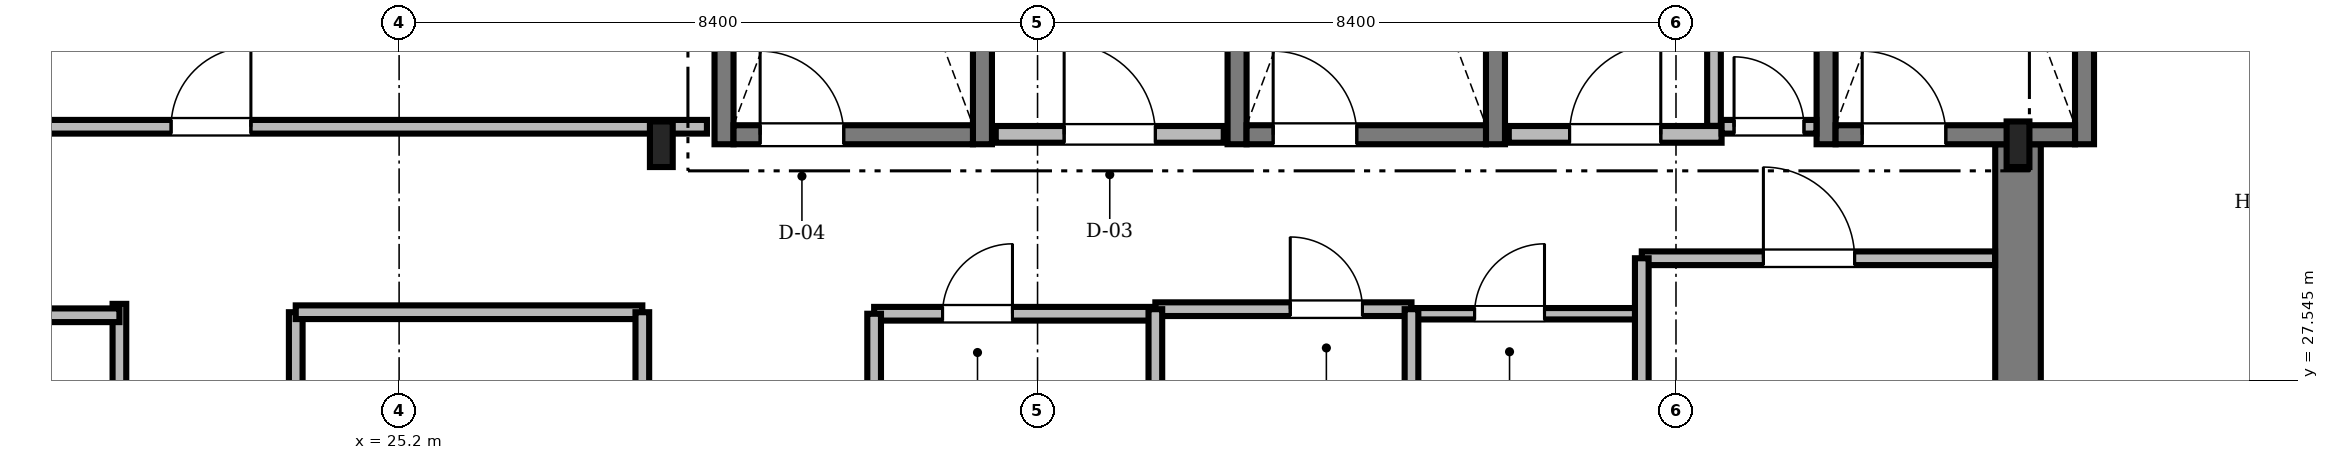
"""IFC4 building model, lengths in metres.
Left out: names, types, materials, properties, quantities, classifications, styles, units other than length and angle.
Written with IfcOpenShell. Run it as: python <this file> out.ifc"""

import sys

from ifc_helpers import new_model, si_unit, direction, frame, frame_2d, origin, origin_2d, place, context, subcontext, project, spatial, rectangle, i_section, extrude, source, transform, mapped, element, fill, save


model = new_model("IFC4")
c1 = context("Model", 3, precision=1e-05, world=origin(), true_north=direction((0.0, 1.0)))
c2 = subcontext(c1, "Body", "Model", "MODEL_VIEW")
j1 = project(units=[si_unit("LENGTHUNIT", "METRE"), si_unit("PLANEANGLEUNIT", "RADIAN")], contexts=[c1])
p1 = place(None, origin())
s1 = spatial("IfcSite", under=j1, at=p1, CompositionType="ELEMENT")
p2 = place(p1, origin())
s2 = spatial("IfcBuilding", under=s1, at=p2, CompositionType="ELEMENT")
p3 = place(p2, frame((0.0, 0.0, 266.4)))
s3 = spatial("IfcBuildingStorey", under=s2, at=p3, CompositionType="ELEMENT", Elevation=266.4)
m1 = source(origin(), c2, "Body", "SweptSolid", [
    extrude(rectangle(XDim=13.15, YDim=0.6, at=frame_2d((6.575, 0.0))), origin(), (0.0, 0.0, 1.0), 3.65),
])
p4 = place(p3, frame((46.5, 17.5, 0.0), z_axis=(0.0, 0.0, 1.0), x_axis=(0.0, 1.0, 0.0)))
e1 = element("IfcWall", 1, at=p4, inside=s3, PredefinedType="SHEAR", context=c2, shape_type="MappedRepresentation", body=[
    mapped(m1, transform((0.0, 0.0, 0.0), scale=1.0)),
])
m2 = source(origin(), c2, "Body", "SweptSolid", [
    extrude(i_section(OverallWidth=0.3, OverallDepth=0.6, WebThickness=0.015, FlangeThickness=0.03, FilletRadius=0.027, at=origin_2d()), origin(), (0.0, 0.0, 1.0), 3.65),
])
for number, where, z_axis, x_axis in (
    (2, (28.65, 30.65, 0.0), (0.0, 0.0, 1.0), (1.0, 0.0, 0.0)),
    (3, (46.5, 30.65, 0.0), (0.0, 0.0, 1.0), (1.0, 0.0, 0.0)),
):
    element("IfcColumn", number, at=place(p3, frame(where, z_axis=z_axis, x_axis=x_axis)), inside=s3, PredefinedType="COLUMN", context=c2, shape_type="MappedRepresentation", body=[
        mapped(m2, transform((0.0, 0.0, 0.0), scale=1.0)),
    ])
m3 = source(origin(), c2, "Body", "SweptSolid", [
    extrude(rectangle(XDim=9.35, YDim=0.25, at=frame_2d((4.675, 0.0))), origin(), (0.0, 0.0, 1.0), 3.75),
])
for number, where, z_axis, x_axis in (
    (4, (29.475, 30.65, 0.0), (0.0, 0.0, 1.0), (0.0, 1.0, 0.0)),
    (5, (32.875, 30.65, 0.0), (0.0, 0.0, 1.0), (0.0, 1.0, 0.0)),
):
    element("IfcWall", number, at=place(p3, frame(where, z_axis=z_axis, x_axis=x_axis)), inside=s3, PredefinedType="SOLIDWALL", context=c2, shape_type="MappedRepresentation", body=[
        mapped(m3, transform((0.0, 0.0, 0.0), scale=1.0)),
    ])
m4 = source(origin(), c2, "Body", "SweptSolid", [
    extrude(rectangle(XDim=3.15, YDim=0.25, at=frame_2d((1.575, 0.0))), origin(), (0.0, 0.0, 1.0), 3.75),
])
p5 = place(p3, frame((29.6, 30.775, 0.0), z_axis=(0.0, 0.0, 1.0), x_axis=(1.0, 0.0, 0.0)))
e6 = element("IfcWall", 6, at=p5, inside=s3, PredefinedType="SOLIDWALL", context=c2, shape_type="MappedRepresentation", body=[
    mapped(m4, transform((0.0, 0.0, 0.0), scale=1.0)),
])
m5 = source(origin(), c2, "Body", "SweptSolid", [
    extrude(rectangle(XDim=1.1, YDim=2.2, at=frame_2d((0.55, 1.1))), frame((0.0, 0.135, 0.0), z_axis=(0.0, -1.0, 0.0), x_axis=(1.0, 0.0, 0.0)), (0.0, 0.0, 1.0), 0.27),
])
p6 = place(p5, frame((0.35, 0.0, 0.0)))
e7 = element("IfcOpeningElement", 7, at=p6, cuts=e6, PredefinedType="OPENING", context=c2, shape_type="MappedRepresentation", body=[
    mapped(m5, transform((0.0, 0.0, 0.0), scale=1.0)),
])
for number, where, z_axis, x_axis in (
    (8, (36.225, 30.65, 0.0), (0.0, 0.0, 1.0), (0.0, 1.0, 0.0)),
    (9, (39.625, 30.65, 0.0), (0.0, 0.0, 1.0), (0.0, 1.0, 0.0)),
):
    element("IfcWall", number, at=place(p3, frame(where, z_axis=z_axis, x_axis=x_axis)), inside=s3, PredefinedType="SOLIDWALL", context=c2, shape_type="MappedRepresentation", body=[
        mapped(m3, transform((0.0, 0.0, 0.0), scale=1.0)),
    ])
p7 = place(p3, frame((36.35, 30.775, 0.0), z_axis=(0.0, 0.0, 1.0), x_axis=(1.0, 0.0, 0.0)))
e10 = element("IfcWall", 10, at=p7, inside=s3, PredefinedType="SOLIDWALL", context=c2, shape_type="MappedRepresentation", body=[
    mapped(m4, transform((0.0, 0.0, 0.0), scale=1.0)),
])
p8 = place(p7, frame((0.35, 0.0, 0.0)))
e11 = element("IfcOpeningElement", 11, at=p8, cuts=e10, PredefinedType="OPENING", context=c2, shape_type="MappedRepresentation", body=[
    mapped(m5, transform((0.0, 0.0, 0.0), scale=1.0)),
])
for number, where, z_axis, x_axis in (
    (12, (43.975, 30.65, 0.0), (0.0, 0.0, 1.0), (0.0, 1.0, 0.0)),
    (13, (47.375, 30.65, 0.0), (0.0, 0.0, 1.0), (0.0, 1.0, 0.0)),
):
    element("IfcWall", number, at=place(p3, frame(where, z_axis=z_axis, x_axis=x_axis)), inside=s3, PredefinedType="SOLIDWALL", context=c2, shape_type="MappedRepresentation", body=[
        mapped(m3, transform((0.0, 0.0, 0.0), scale=1.0)),
    ])
p9 = place(p3, frame((44.1, 30.775, 0.0), z_axis=(0.0, 0.0, 1.0), x_axis=(1.0, 0.0, 0.0)))
e14 = element("IfcWall", 14, at=p9, inside=s3, PredefinedType="SOLIDWALL", context=c2, shape_type="MappedRepresentation", body=[
    mapped(m4, transform((0.0, 0.0, 0.0), scale=1.0)),
])
p10 = place(p9, frame((0.35, 0.0, 0.0)))
e15 = element("IfcOpeningElement", 15, at=p10, cuts=e14, PredefinedType="OPENING", context=c2, shape_type="MappedRepresentation", body=[
    mapped(m5, transform((0.0, 0.0, 0.0), scale=1.0)),
])
m6 = source(origin(), c2, "Body", "SweptSolid", [
    extrude(rectangle(XDim=3.0, YDim=0.22, at=frame_2d((1.5, 0.0))), origin(), (0.0, 0.0, 1.0), 3.65),
])
p11 = place(p3, frame((33.05, 30.78, 0.0), z_axis=(0.0, 0.0, 1.0), x_axis=(1.0, 0.0, 0.0)))
e16 = element("IfcWall", 16, at=p11, inside=s3, PredefinedType="SOLIDWALL", context=c2, shape_type="MappedRepresentation", body=[
    mapped(m6, transform((0.0, 0.0, 0.0), scale=1.0)),
])
m7 = source(origin(), c2, "Body", "SweptSolid", [
    extrude(rectangle(XDim=1.2, YDim=2.2, at=frame_2d((0.6, 1.1))), frame((0.0, 0.12, 0.0), z_axis=(0.0, -1.0, 0.0), x_axis=(1.0, 0.0, 0.0)), (0.0, 0.0, 1.0), 0.24),
])
p12 = place(p11, frame((0.9, 0.0, 0.0)))
e17 = element("IfcOpeningElement", 17, at=p12, cuts=e16, PredefinedType="OPENING", context=c2, shape_type="MappedRepresentation", body=[
    mapped(m7, transform((0.0, 0.0, 0.0), scale=1.0)),
])
m8 = source(origin(), c2, "Body", "SweptSolid", [
    extrude(rectangle(XDim=2.8, YDim=0.22, at=frame_2d((1.4, 0.0))), origin(), (0.0, 0.0, 1.0), 3.65),
])
p13 = place(p3, frame((39.8, 30.78, 0.0), z_axis=(0.0, 0.0, 1.0), x_axis=(1.0, 0.0, 0.0)))
e18 = element("IfcWall", 18, at=p13, inside=s3, PredefinedType="SOLIDWALL", context=c2, shape_type="MappedRepresentation", body=[
    mapped(m8, transform((0.0, 0.0, 0.0), scale=1.0)),
])
p14 = place(p13, frame((0.8, 0.0, 0.0)))
e19 = element("IfcOpeningElement", 19, at=p14, cuts=e18, PredefinedType="OPENING", context=c2, shape_type="MappedRepresentation", body=[
    mapped(m7, transform((0.0, 0.0, 0.0), scale=1.0)),
])
m9 = source(origin(), c2, "Body", "SweptSolid", [
    extrude(rectangle(XDim=14.42, YDim=0.18, at=frame_2d((7.21, 0.0))), origin(), (0.0, 0.0, 1.0), 3.092),
])
p15 = place(p3, frame((21.52, 14.13, 0.0), z_axis=(0.0, 0.0, 1.0), x_axis=(0.0, 1.0, 0.0)))
e20 = element("IfcWall", 20, at=p15, inside=s3, PredefinedType="PARTITIONING", context=c2, shape_type="MappedRepresentation", body=[
    mapped(m9, transform((0.0, 0.0, 0.0), scale=1.0)),
])
m10 = source(origin(), c2, "Body", "SweptSolid", [
    extrude(rectangle(XDim=1.05, YDim=2.2, at=frame_2d((0.525, 1.1))), frame((0.0, 0.1, 0.0), z_axis=(0.0, -1.0, 0.0), x_axis=(1.0, 0.0, 0.0)), (0.0, 0.0, 1.0), 0.2),
])
p16 = place(p15, frame((3.048, 0.0, 0.0)))
e21 = element("IfcOpeningElement", 21, at=p16, cuts=e20, PredefinedType="OPENING", context=c2, shape_type="MappedRepresentation", body=[
    mapped(m10, transform((0.0, 0.0, 0.0), scale=1.0)),
])
p17 = place(p15, frame((10.183, 0.0, 0.0)))
e22 = element("IfcOpeningElement", 22, at=p17, cuts=e20, PredefinedType="OPENING", context=c2, shape_type="MappedRepresentation", body=[
    mapped(m10, transform((0.0, 0.0, 0.0), scale=1.0)),
])
m11 = source(origin(), c2, "Body", "SweptSolid", [
    extrude(rectangle(XDim=11.708, YDim=0.18, at=frame_2d((5.854, 0.0))), origin(), (0.0, 0.0, 1.0), 2.892),
])
p18 = place(p3, frame((17.542, 30.88, 0.0), z_axis=(0.0, 0.0, 1.0), x_axis=(1.0, 0.0, 0.0)))
e23 = element("IfcWall", 23, at=p18, inside=s3, PredefinedType="PARTITIONING", context=c2, shape_type="MappedRepresentation", body=[
    mapped(m11, transform((0.0, 0.0, 0.0), scale=1.0)),
])
p19 = place(p18, frame((4.658, 0.0, 0.0)))
e24 = element("IfcOpeningElement", 24, at=p19, cuts=e23, PredefinedType="OPENING", context=c2, shape_type="MappedRepresentation", body=[
    mapped(m10, transform((0.0, 0.0, 0.0), scale=1.0)),
])
m12 = source(origin(), c2, "Body", "SweptSolid", [
    extrude(rectangle(XDim=4.648, YDim=0.18, at=frame_2d((2.324, 0.0))), origin(), (0.0, 0.0, 1.0), 3.282),
])
p20 = place(p3, frame((41.55, 29.15, 0.0), z_axis=(0.0, 0.0, 1.0), x_axis=(1.0, 0.0, 0.0)))
e25 = element("IfcWall", 25, at=p20, inside=s3, PredefinedType="PARTITIONING", context=c2, shape_type="MappedRepresentation", body=[
    mapped(m12, transform((0.0, 0.0, 0.0), scale=1.0)),
])
m13 = source(origin(), c2, "Body", "SweptSolid", [
    extrude(rectangle(XDim=1.2, YDim=2.2, at=frame_2d((0.6, 1.1))), frame((0.0, 0.1, 0.0), z_axis=(0.0, -1.0, 0.0), x_axis=(1.0, 0.0, 0.0)), (0.0, 0.0, 1.0), 0.2),
])
p21 = place(p20, frame((1.6, 0.0, 0.0)))
e26 = element("IfcOpeningElement", 26, at=p21, cuts=e25, PredefinedType="OPENING", context=c2, shape_type="MappedRepresentation", body=[
    mapped(m13, transform((0.0, 0.0, 0.0), scale=1.0)),
])
m14 = source(origin(), c2, "Body", "SweptSolid", [
    extrude(rectangle(XDim=4.24, YDim=0.18, at=frame_2d((2.12, 0.0))), origin(), (0.0, 0.0, 1.0), 3.092),
])
p22 = place(p3, frame((23.84, 24.2, 0.0), z_axis=(0.0, 0.0, 1.0), x_axis=(0.0, 1.0, 0.0)))
e27 = element("IfcWall", 27, at=p22, inside=s3, PredefinedType="PARTITIONING", context=c2, shape_type="MappedRepresentation", body=[
    mapped(m14, transform((0.0, 0.0, 0.0), scale=1.0)),
])
p23 = place(p22, frame((1.4, 0.0, 0.0)))
e28 = element("IfcOpeningElement", 28, at=p23, cuts=e27, PredefinedType="OPENING", context=c2, shape_type="MappedRepresentation", body=[
    mapped(m10, transform((0.0, 0.0, 0.0), scale=1.0)),
])
m15 = source(origin(), c2, "Body", "SweptSolid", [
    extrude(rectangle(XDim=3.7, YDim=0.18, at=frame_2d((1.85, 0.0))), origin(), (0.0, 0.0, 1.0), 3.282),
])
p24 = place(p3, frame((31.45, 28.42, 0.0), z_axis=(0.0, 0.0, 1.0), x_axis=(1.0, 0.0, 0.0)))
e29 = element("IfcWall", 29, at=p24, inside=s3, PredefinedType="PARTITIONING", context=c2, shape_type="MappedRepresentation", body=[
    mapped(m15, transform((0.0, 0.0, 0.0), scale=1.0)),
])
m16 = source(origin(), c2, "Body", "SweptSolid", [
    extrude(rectangle(XDim=0.92, YDim=2.1, at=frame_2d((0.46, 1.05))), frame((0.0, 0.1, 0.0), z_axis=(0.0, -1.0, 0.0), x_axis=(1.0, 0.0, 0.0)), (0.0, 0.0, 1.0), 0.2),
])
p25 = place(p24, frame((0.9, 0.0, 0.0)))
e30 = element("IfcOpeningElement", 30, at=p25, cuts=e29, PredefinedType="OPENING", context=c2, shape_type="MappedRepresentation", body=[
    mapped(m16, transform((0.0, 0.0, 0.0), scale=1.0)),
])
m17 = source(origin(), c2, "Body", "SweptSolid", [
    extrude(rectangle(XDim=3.37, YDim=0.18, at=frame_2d((1.685, 0.0))), origin(), (0.0, 0.0, 1.0), 3.65),
])
p26 = place(p3, frame((35.15, 28.48, 0.0), z_axis=(0.0, 0.0, 1.0), x_axis=(1.0, 0.0, 0.0)))
e31 = element("IfcWall", 31, at=p26, inside=s3, PredefinedType="PARTITIONING", context=c2, shape_type="MappedRepresentation", body=[
    mapped(m17, transform((0.0, 0.0, 0.0), scale=1.0)),
])
m18 = source(origin(), c2, "Body", "SweptSolid", [
    extrude(rectangle(XDim=0.95, YDim=2.15, at=frame_2d((0.475, 1.075))), frame((0.0, 0.1, 0.0), z_axis=(0.0, -1.0, 0.0), x_axis=(1.0, 0.0, 0.0)), (0.0, 0.0, 1.0), 0.2),
])
p27 = place(p26, frame((1.775, 0.0, 0.0)))
e32 = element("IfcOpeningElement", 32, at=p27, cuts=e31, PredefinedType="OPENING", context=c2, shape_type="MappedRepresentation", body=[
    mapped(m18, transform((0.0, 0.0, 0.0), scale=1.0)),
])
m19 = source(origin(), c2, "Body", "SweptSolid", [
    extrude(rectangle(XDim=3.0, YDim=0.15, at=frame_2d((1.5, 0.0))), origin(), (0.0, 0.0, 1.0), 3.65),
])
p28 = place(p3, frame((38.52, 28.42, 0.0), z_axis=(0.0, 0.0, 1.0), x_axis=(1.0, 0.0, 0.0)))
e33 = element("IfcWall", 33, at=p28, inside=s3, PredefinedType="PARTITIONING", context=c2, shape_type="MappedRepresentation", body=[
    mapped(m19, transform((0.0, 0.0, 0.0), scale=1.0)),
])
m20 = source(origin(), c2, "Body", "SweptSolid", [
    extrude(rectangle(XDim=0.92, YDim=2.1, at=frame_2d((0.46, 1.05))), frame((0.0, 0.085, 0.0), z_axis=(0.0, -1.0, 0.0), x_axis=(1.0, 0.0, 0.0)), (0.0, 0.0, 1.0), 0.17),
])
p29 = place(p28, frame((0.83, 0.0, 0.0)))
e34 = element("IfcOpeningElement", 34, at=p29, cuts=e33, PredefinedType="OPENING", context=c2, shape_type="MappedRepresentation", body=[
    mapped(m20, transform((0.0, 0.0, 0.0), scale=1.0)),
])
m21 = source(origin(), c2, "Body", "SweptSolid", [
    extrude(rectangle(XDim=1.248, YDim=0.18, at=frame_2d((0.624, 0.0))), origin(), (0.0, 0.0, 1.0), 3.65),
])
p30 = place(p3, frame((42.6, 30.88, 0.0), z_axis=(0.0, 0.0, 1.0), x_axis=(1.0, 0.0, 0.0)))
e35 = element("IfcWall", 35, at=p30, inside=s3, PredefinedType="PARTITIONING", context=c2, shape_type="MappedRepresentation", body=[
    mapped(m21, transform((0.0, 0.0, 0.0), scale=1.0)),
])
p31 = place(p30, frame((0.164, 0.0, 0.0)))
e36 = element("IfcOpeningElement", 36, at=p31, cuts=e35, PredefinedType="OPENING", context=c2, shape_type="MappedRepresentation", body=[
    mapped(m16, transform((0.0, 0.0, 0.0), scale=1.0)),
])
m22 = source(origin(), c2, "Body", "SweptSolid", [
    extrude(rectangle(XDim=4.56, YDim=0.18, at=frame_2d((2.28, 0.0))), origin(), (0.0, 0.0, 1.0), 3.65),
])
p32 = place(p3, frame((23.84, 28.44, 0.0), z_axis=(0.0, 0.0, 1.0), x_axis=(1.0, 0.0, 0.0)))
e37 = element("IfcWall", 37, at=p32, inside=s3, PredefinedType="PARTITIONING", context=c2, shape_type="MappedRepresentation", body=[
    mapped(m22, transform((0.0, 0.0, 0.0), scale=1.0)),
])
p33 = place(p3, frame((28.4, 24.2, 0.0), z_axis=(0.0, 0.0, 1.0), x_axis=(0.0, 1.0, 0.0)))
e38 = element("IfcWall", 38, at=p33, inside=s3, PredefinedType="PARTITIONING", context=c2, shape_type="MappedRepresentation", body=[
    mapped(m14, transform((0.0, 0.0, 0.0), scale=1.0)),
])
m23 = source(origin(), c2, "Body", "SweptSolid", [
    extrude(rectangle(XDim=4.17, YDim=0.18, at=frame_2d((2.085, 0.0))), origin(), (0.0, 0.0, 1.0), 2.892),
])
p34 = place(p3, frame((17.35, 28.4, 0.0), z_axis=(0.0, 0.0, 1.0), x_axis=(1.0, 0.0, 0.0)))
e39 = element("IfcWall", 39, at=p34, inside=s3, PredefinedType="PARTITIONING", context=c2, shape_type="MappedRepresentation", body=[
    mapped(m23, transform((0.0, 0.0, 0.0), scale=1.0)),
])
m24 = source(origin(), c2, "Body", "SweptSolid", [
    extrude(rectangle(XDim=2.35, YDim=0.18, at=frame_2d((1.175, 0.0))), origin(), (0.0, 0.0, 1.0), 3.282),
])
p35 = place(p3, frame((41.55, 26.8, 0.0), z_axis=(0.0, 0.0, 1.0), x_axis=(0.0, 1.0, 0.0)))
e40 = element("IfcWall", 40, at=p35, inside=s3, PredefinedType="PARTITIONING", context=c2, shape_type="MappedRepresentation", body=[
    mapped(m24, transform((0.0, 0.0, 0.0), scale=1.0)),
])
m25 = source(origin(), c2, "Body", "SweptSolid", [
    extrude(rectangle(XDim=1.858, YDim=0.18, at=frame_2d((0.929, 0.0))), origin(), (0.0, 0.0, 1.0), 3.65),
])
p36 = place(p3, frame((42.5, 30.892, 0.0), z_axis=(0.0, 0.0, 1.0), x_axis=(0.0, 1.0, 0.0)))
e41 = element("IfcWall", 41, at=p36, inside=s3, PredefinedType="PARTITIONING", context=c2, shape_type="MappedRepresentation", body=[
    mapped(m25, transform((0.0, 0.0, 0.0), scale=1.0)),
])
m26 = source(origin(), c2, "Body", "SweptSolid", [
    extrude(rectangle(XDim=1.66, YDim=0.18, at=frame_2d((0.83, 0.0))), origin(), (0.0, 0.0, 1.0), 3.192),
])
for number, where, z_axis, x_axis in (
    (42, (35.15, 26.82, 0.0), (0.0, 0.0, 1.0), (0.0, 1.0, 0.0)),
    (43, (38.52, 26.82, 0.0), (0.0, 0.0, 1.0), (0.0, 1.0, 0.0)),
):
    element("IfcWall", number, at=place(p3, frame(where, z_axis=z_axis, x_axis=x_axis)), inside=s3, PredefinedType="PARTITIONING", context=c2, shape_type="MappedRepresentation", body=[
        mapped(m26, transform((0.0, 0.0, 0.0), scale=1.0)),
    ])
m27 = source(origin(), c2, "Body", "SweptSolid", [
    extrude(rectangle(XDim=1.6, YDim=0.18, at=frame_2d((0.8, 0.0))), origin(), (0.0, 0.0, 1.0), 3.192),
])
p37 = place(p3, frame((31.45, 26.82, 0.0), z_axis=(0.0, 0.0, 1.0), x_axis=(0.0, 1.0, 0.0)))
e44 = element("IfcWall", 44, at=p37, inside=s3, PredefinedType="PARTITIONING", context=c2, shape_type="MappedRepresentation", body=[
    mapped(m27, transform((0.0, 0.0, 0.0), scale=1.0)),
])
m28 = source(origin(), c2, "Body", "SweptSolid", [
    extrude(rectangle(XDim=1.1, YDim=2.2, at=frame_2d((0.55, 1.1))), frame((0.0, 0.025, 0.0), z_axis=(0.0, -1.0, 0.0), x_axis=(1.0, 0.0, 0.0)), (0.0, 0.0, 1.0), 0.05),
])
p38 = place(p6, origin())
e45 = element("IfcDoor", 45, at=p38, inside=s3, OperationType="SINGLE_SWING_LEFT", PredefinedType="DOOR", context=c2, shape_type="MappedRepresentation", body=[
    mapped(m28, transform((0.0, 0.0, 0.0), scale=1.0)),
])
fill(e7, e45)
p39 = place(p8, origin())
e46 = element("IfcDoor", 46, at=p39, inside=s3, OperationType="SINGLE_SWING_LEFT", PredefinedType="DOOR", context=c2, shape_type="MappedRepresentation", body=[
    mapped(m28, transform((0.0, 0.0, 0.0), scale=1.0)),
])
fill(e11, e46)
p40 = place(p10, origin())
e47 = element("IfcDoor", 47, at=p40, inside=s3, OperationType="SINGLE_SWING_LEFT", PredefinedType="DOOR", context=c2, shape_type="MappedRepresentation", body=[
    mapped(m28, transform((0.0, 0.0, 0.0), scale=1.0)),
])
fill(e15, e47)
m29 = source(origin(), c2, "Body", "SweptSolid", [
    extrude(rectangle(XDim=1.2, YDim=2.2, at=frame_2d((0.6, 1.1))), frame((0.0, 0.025, 0.0), z_axis=(0.0, -1.0, 0.0), x_axis=(1.0, 0.0, 0.0)), (0.0, 0.0, 1.0), 0.05),
])
p41 = place(p12, origin())
e48 = element("IfcDoor", 48, at=p41, inside=s3, OperationType="SINGLE_SWING_LEFT", PredefinedType="DOOR", context=c2, shape_type="MappedRepresentation", body=[
    mapped(m29, transform((0.0, 0.0, 0.0), scale=1.0)),
])
fill(e17, e48)
p42 = place(p14, origin())
e49 = element("IfcDoor", 49, at=p42, inside=s3, OperationType="SINGLE_SWING_RIGHT", PredefinedType="DOOR", context=c2, shape_type="MappedRepresentation", body=[
    mapped(m29, transform((0.0, 0.0, 0.0), scale=1.0)),
])
fill(e19, e49)
m30 = source(origin(), c2, "Body", "SweptSolid", [
    extrude(rectangle(XDim=1.05, YDim=2.2, at=frame_2d((0.525, 1.1))), frame((0.0, 0.025, 0.0), z_axis=(0.0, -1.0, 0.0), x_axis=(1.0, 0.0, 0.0)), (0.0, 0.0, 1.0), 0.05),
])
p43 = place(p19, origin())
e50 = element("IfcDoor", 50, at=p43, inside=s3, OperationType="SINGLE_SWING_RIGHT", PredefinedType="DOOR", context=c2, shape_type="MappedRepresentation", body=[
    mapped(m30, transform((0.0, 0.0, 0.0), scale=1.0)),
])
fill(e24, e50)
p44 = place(p21, origin())
e51 = element("IfcDoor", 51, at=p44, inside=s3, OperationType="SINGLE_SWING_LEFT", PredefinedType="DOOR", context=c2, shape_type="MappedRepresentation", body=[
    mapped(m29, transform((0.0, 0.0, 0.0), scale=1.0)),
])
fill(e26, e51)
m31 = source(origin(), c2, "Body", "SweptSolid", [
    extrude(rectangle(XDim=0.92, YDim=2.1, at=frame_2d((0.46, 1.05))), frame((0.0, 0.025, 0.0), z_axis=(0.0, -1.0, 0.0), x_axis=(1.0, 0.0, 0.0)), (0.0, 0.0, 1.0), 0.05),
])
p45 = place(p25, origin())
e52 = element("IfcDoor", 52, at=p45, inside=s3, OperationType="SINGLE_SWING_RIGHT", PredefinedType="DOOR", context=c2, shape_type="MappedRepresentation", body=[
    mapped(m31, transform((0.0, 0.0, 0.0), scale=1.0)),
])
fill(e30, e52)
m32 = source(origin(), c2, "Body", "SweptSolid", [
    extrude(rectangle(XDim=0.95, YDim=2.15, at=frame_2d((0.475, 1.075))), frame((0.0, 0.025, 0.0), z_axis=(0.0, -1.0, 0.0), x_axis=(1.0, 0.0, 0.0)), (0.0, 0.0, 1.0), 0.05),
])
p46 = place(p27, origin())
e53 = element("IfcDoor", 53, at=p46, inside=s3, OperationType="SINGLE_SWING_LEFT", PredefinedType="DOOR", context=c2, shape_type="MappedRepresentation", body=[
    mapped(m32, transform((0.0, 0.0, 0.0), scale=1.0)),
])
fill(e32, e53)
p47 = place(p29, origin())
e54 = element("IfcDoor", 54, at=p47, inside=s3, OperationType="SINGLE_SWING_RIGHT", PredefinedType="DOOR", context=c2, shape_type="MappedRepresentation", body=[
    mapped(m31, transform((0.0, 0.0, 0.0), scale=1.0)),
])
fill(e34, e54)
p48 = place(p31, origin())
e55 = element("IfcDoor", 55, at=p48, inside=s3, OperationType="SINGLE_SWING_LEFT", PredefinedType="DOOR", context=c2, shape_type="MappedRepresentation", body=[
    mapped(m31, transform((0.0, 0.0, 0.0), scale=1.0)),
])
fill(e36, e55)
save(model, sys.argv[1])
